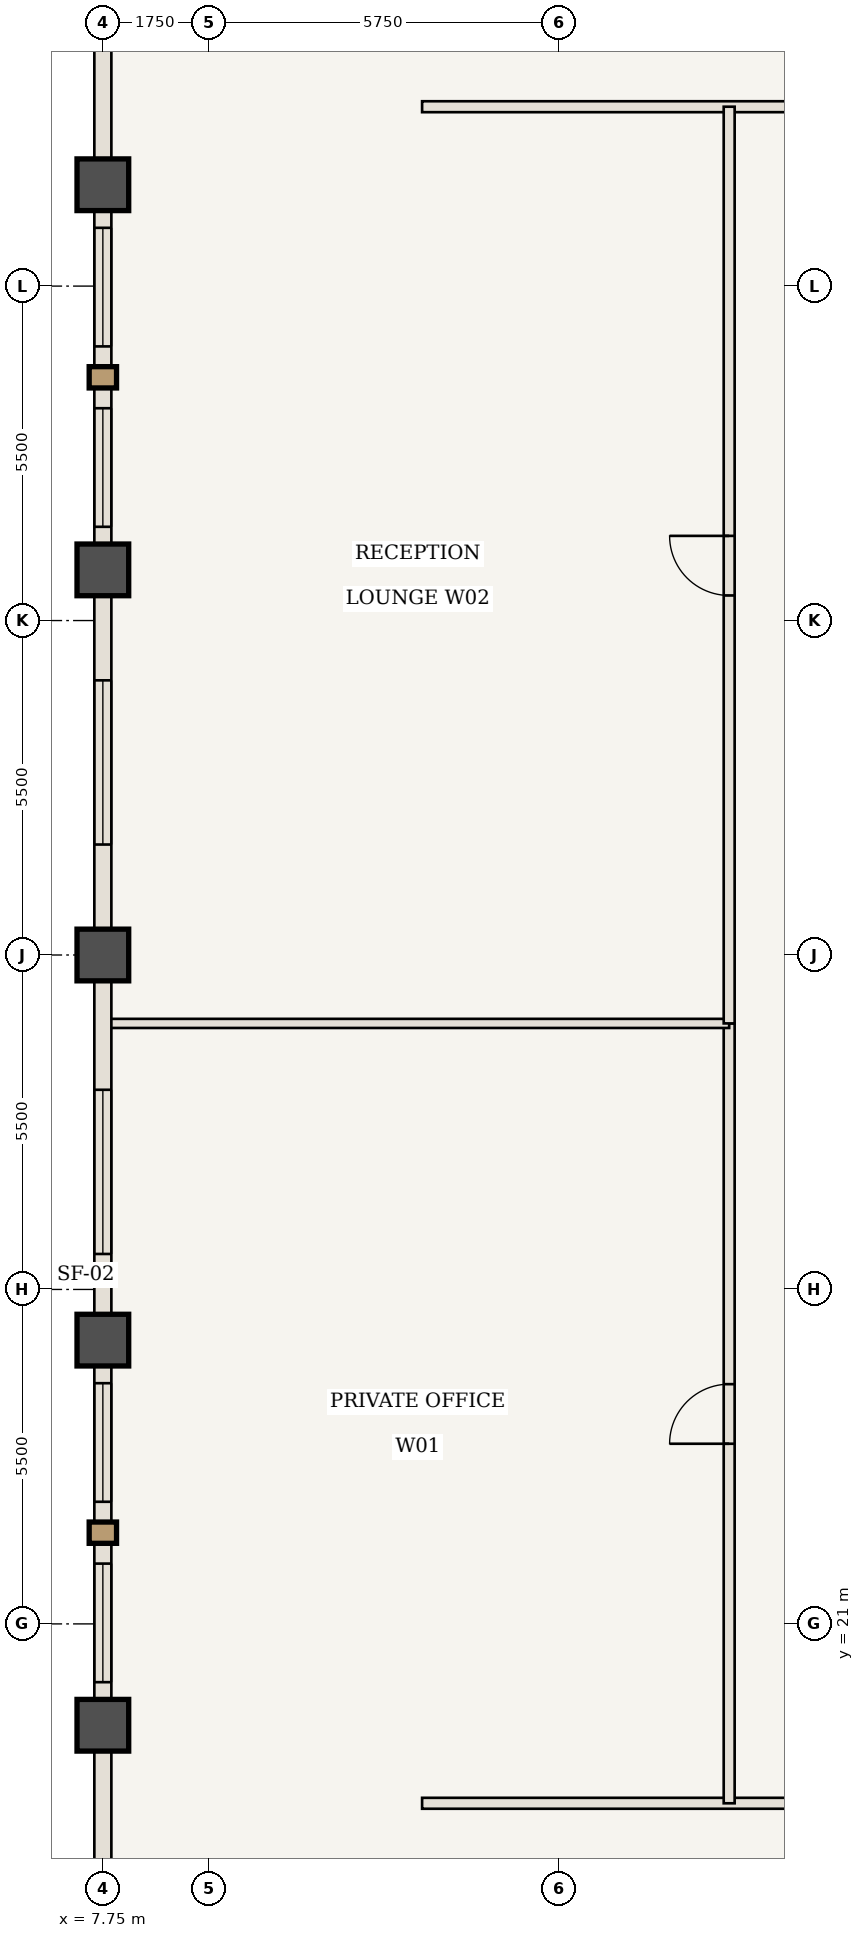
"""IFC4 building model, lengths in metres.
Left out: names, types, materials, properties, quantities, classifications, styles, units other than length and angle.
Written with IfcOpenShell. Run it as: python <this file> out.ifc"""

import sys

from ifc_helpers import new_model, si_unit, direction, frame, frame_2d, origin, origin_2d, place, context, subcontext, project, spatial, rectangle, extrude, element, fill, save


model = new_model("IFC4")
c1 = context("Model", 3, precision=1e-05, world=origin(), true_north=direction((0.0, 1.0)))
c2 = subcontext(c1, "Body", "Model", "MODEL_VIEW")
j1 = project(units=[si_unit("LENGTHUNIT", "METRE"), si_unit("PLANEANGLEUNIT", "RADIAN")], contexts=[c1])
p1 = place(None, origin())
s1 = spatial("IfcSite", under=j1, at=p1, CompositionType="ELEMENT")
p2 = place(p1, origin())
s2 = spatial("IfcBuilding", under=s1, at=p2, CompositionType="ELEMENT")
p3 = place(p2, frame((0.0, 0.0, 198.45)))
s3 = spatial("IfcBuildingStorey", under=s2, at=p3, CompositionType="ELEMENT", Elevation=198.45)
for number, where, z_axis, x_axis in (
    (1, (7.75, 19.333, 0.0), (0.0, 0.0, 1.0), (1.0, 0.0, 0.0)),
    (2, (7.75, 25.667, 0.0), (0.0, 0.0, 1.0), (1.0, 0.0, 0.0)),
    (3, (7.75, 32.0, 0.0), (0.0, 0.0, 1.0), (1.0, 0.0, 0.0)),
    (4, (7.75, 38.333, 0.0), (0.0, 0.0, 1.0), (1.0, 0.0, 0.0)),
    (5, (7.75, 44.667, 0.0), (0.0, 0.0, 1.0), (1.0, 0.0, 0.0)),
):
    element("IfcColumn", number, at=place(p3, frame(where, z_axis=z_axis, x_axis=x_axis)), inside=s3, PredefinedType="COLUMN", context=c2, shape_type="SweptSolid", body=[
        extrude(rectangle(XDim=0.85, YDim=0.85, at=origin_2d()), origin(), (0.0, 0.0, 1.0), 3.85),
    ])
p4 = place(p3, frame((13.0, 18.05, 0.0), z_axis=(0.0, 0.0, 1.0), x_axis=(1.0, 0.0, 0.0)))
e6 = element("IfcWall", 6, at=p4, inside=s3, PredefinedType="STANDARD", context=c2, shape_type="SweptSolid", body=[
    extrude(rectangle(XDim=13.242, YDim=0.18, at=frame_2d((6.621, 0.0))), origin(), (0.0, 0.0, 1.0), 3.685),
])
p5 = place(p4, frame((8.646, 0.0, 0.0)))
e7 = element("IfcOpeningElement", 7, at=p5, cuts=e6, PredefinedType="OPENING", context=c2, shape_type="SweptSolid", body=[
    extrude(rectangle(XDim=0.98, YDim=2.2, at=frame_2d((0.49, 1.1))), frame((0.0, 0.1, 0.0), z_axis=(0.0, -1.0, 0.0), x_axis=(1.0, 0.0, 0.0)), (0.0, 0.0, 1.0), 0.2),
])
p6 = place(p3, frame((13.0, 45.95, 0.0), z_axis=(0.0, 0.0, 1.0), x_axis=(1.0, 0.0, 0.0)))
e8 = element("IfcWall", 8, at=p6, inside=s3, PredefinedType="STANDARD", context=c2, shape_type="SweptSolid", body=[
    extrude(rectangle(XDim=13.592, YDim=0.18, at=frame_2d((6.796, 0.0))), origin(), (0.0, 0.0, 1.0), 3.685),
])
p7 = place(p6, frame((8.821, 0.0, 0.0)))
e9 = element("IfcOpeningElement", 9, at=p7, cuts=e8, PredefinedType="OPENING", context=c2, shape_type="SweptSolid", body=[
    extrude(rectangle(XDim=0.98, YDim=2.2, at=frame_2d((0.49, 1.1))), frame((0.0, 0.1, 0.0), z_axis=(0.0, -1.0, 0.0), x_axis=(1.0, 0.0, 0.0)), (0.0, 0.0, 1.0), 0.2),
])
p8 = place(p3, frame((18.05, 18.05, 0.0), z_axis=(0.0, 0.0, 1.0), x_axis=(0.0, 1.0, 0.0)))
e10 = element("IfcWall", 10, at=p8, inside=s3, PredefinedType="STANDARD", context=c2, shape_type="SweptSolid", body=[
    extrude(rectangle(XDim=12.825, YDim=0.18, at=frame_2d((6.413, 0.0))), origin(), (0.0, 0.0, 1.0), 3.685),
])
p9 = place(p8, frame((5.913, 0.0, 0.0)))
e11 = element("IfcOpeningElement", 11, at=p9, cuts=e10, PredefinedType="OPENING", context=c2, shape_type="SweptSolid", body=[
    extrude(rectangle(XDim=0.98, YDim=2.2, at=frame_2d((0.49, 1.1))), frame((0.0, 0.1, 0.0), z_axis=(0.0, -1.0, 0.0), x_axis=(1.0, 0.0, 0.0)), (0.0, 0.0, 1.0), 0.2),
])
p10 = place(p3, frame((7.81, 30.875, 0.0), z_axis=(0.0, 0.0, 1.0), x_axis=(1.0, 0.0, 0.0)))
e12 = element("IfcWall", 12, at=p10, inside=s3, PredefinedType="STANDARD", context=c2, shape_type="SweptSolid", body=[
    extrude(rectangle(XDim=10.24, YDim=0.15, at=frame_2d((5.12, 0.0))), origin(), (0.0, 0.0, 1.0), 3.685),
])
p11 = place(p3, frame((18.05, 30.875, 0.0), z_axis=(0.0, 0.0, 1.0), x_axis=(0.0, 1.0, 0.0)))
e13 = element("IfcWall", 13, at=p11, inside=s3, PredefinedType="STANDARD", context=c2, shape_type="SweptSolid", body=[
    extrude(rectangle(XDim=15.075, YDim=0.18, at=frame_2d((7.538, 0.0))), origin(), (0.0, 0.0, 1.0), 3.685),
])
p12 = place(p11, frame((7.038, 0.0, 0.0)))
e14 = element("IfcOpeningElement", 14, at=p12, cuts=e13, PredefinedType="OPENING", context=c2, shape_type="SweptSolid", body=[
    extrude(rectangle(XDim=0.98, YDim=2.2, at=frame_2d((0.49, 1.1))), frame((0.0, 0.1, 0.0), z_axis=(0.0, -1.0, 0.0), x_axis=(1.0, 0.0, 0.0)), (0.0, 0.0, 1.0), 0.2),
])
p13 = place(p3, frame((7.75, 13.0, 0.0), z_axis=(0.0, 0.0, 1.0), x_axis=(0.0, 1.0, 0.0)))
e15 = element("IfcWall", 15, at=p13, inside=s3, PredefinedType="USERDEFINED", context=c2, shape_type="SweptSolid", body=[
    extrude(rectangle(XDim=6.333, YDim=0.28, at=frame_2d((3.167, 0.0))), origin(), (0.0, 0.0, 1.0), 2.985),
])
p14 = place(p3, frame((7.75, 19.333, 0.0), z_axis=(0.0, 0.0, 1.0), x_axis=(0.0, 1.0, 0.0)))
e16 = element("IfcWall", 16, at=p14, inside=s3, PredefinedType="USERDEFINED", context=c2, shape_type="SweptSolid", body=[
    extrude(rectangle(XDim=6.333, YDim=0.28, at=frame_2d((3.167, 0.0))), origin(), (0.0, 0.0, 1.0), 2.985),
])
p15 = place(p14, frame((0.708, 0.0, 0.85)))
e17 = element("IfcOpeningElement", 17, at=p15, cuts=e16, PredefinedType="OPENING", context=c2, shape_type="SweptSolid", body=[
    extrude(rectangle(XDim=1.95, YDim=1.935, at=frame_2d((0.975, 0.968))), frame((0.0, 0.15, 0.0), z_axis=(0.0, -1.0, 0.0), x_axis=(1.0, 0.0, 0.0)), (0.0, 0.0, 1.0), 0.3),
])
p16 = place(p14, frame((3.675, 0.0, 0.85)))
e18 = element("IfcOpeningElement", 18, at=p16, cuts=e16, PredefinedType="OPENING", context=c2, shape_type="SweptSolid", body=[
    extrude(rectangle(XDim=1.95, YDim=1.935, at=frame_2d((0.975, 0.968))), frame((0.0, 0.15, 0.0), z_axis=(0.0, -1.0, 0.0), x_axis=(1.0, 0.0, 0.0)), (0.0, 0.0, 1.0), 0.3),
])
p17 = place(p3, frame((7.75, 25.667, 0.0), z_axis=(0.0, 0.0, 1.0), x_axis=(0.0, 1.0, 0.0)))
e19 = element("IfcWall", 19, at=p17, inside=s3, PredefinedType="USERDEFINED", context=c2, shape_type="SweptSolid", body=[
    extrude(rectangle(XDim=6.333, YDim=0.28, at=frame_2d((3.167, 0.0))), origin(), (0.0, 0.0, 1.0), 2.985),
])
p18 = place(p17, frame((1.417, 0.0, 0.85)))
e20 = element("IfcOpeningElement", 20, at=p18, cuts=e19, PredefinedType="OPENING", context=c2, shape_type="SweptSolid", body=[
    extrude(rectangle(XDim=2.7, YDim=1.935, at=frame_2d((1.35, 0.968))), frame((0.0, 0.15, 0.0), z_axis=(0.0, -1.0, 0.0), x_axis=(1.0, 0.0, 0.0)), (0.0, 0.0, 1.0), 0.3),
])
p19 = place(p3, frame((7.75, 32.0, 0.0), z_axis=(0.0, 0.0, 1.0), x_axis=(0.0, 1.0, 0.0)))
e21 = element("IfcWall", 21, at=p19, inside=s3, PredefinedType="USERDEFINED", context=c2, shape_type="SweptSolid", body=[
    extrude(rectangle(XDim=6.333, YDim=0.28, at=frame_2d((3.167, 0.0))), origin(), (0.0, 0.0, 1.0), 2.985),
])
p20 = place(p19, frame((1.817, 0.0, 0.85)))
e22 = element("IfcOpeningElement", 22, at=p20, cuts=e21, PredefinedType="OPENING", context=c2, shape_type="SweptSolid", body=[
    extrude(rectangle(XDim=2.7, YDim=1.935, at=frame_2d((1.35, 0.968))), frame((0.0, 0.15, 0.0), z_axis=(0.0, -1.0, 0.0), x_axis=(1.0, 0.0, 0.0)), (0.0, 0.0, 1.0), 0.3),
])
p21 = place(p3, frame((7.75, 38.333, 0.0), z_axis=(0.0, 0.0, 1.0), x_axis=(0.0, 1.0, 0.0)))
e23 = element("IfcWall", 23, at=p21, inside=s3, PredefinedType="USERDEFINED", context=c2, shape_type="SweptSolid", body=[
    extrude(rectangle(XDim=6.333, YDim=0.28, at=frame_2d((3.167, 0.0))), origin(), (0.0, 0.0, 1.0), 2.985),
])
p22 = place(p21, frame((0.708, 0.0, 0.85)))
e24 = element("IfcOpeningElement", 24, at=p22, cuts=e23, PredefinedType="OPENING", context=c2, shape_type="SweptSolid", body=[
    extrude(rectangle(XDim=1.95, YDim=1.935, at=frame_2d((0.975, 0.968))), frame((0.0, 0.15, 0.0), z_axis=(0.0, -1.0, 0.0), x_axis=(1.0, 0.0, 0.0)), (0.0, 0.0, 1.0), 0.3),
])
p23 = place(p21, frame((3.675, 0.0, 0.85)))
e25 = element("IfcOpeningElement", 25, at=p23, cuts=e23, PredefinedType="OPENING", context=c2, shape_type="SweptSolid", body=[
    extrude(rectangle(XDim=1.95, YDim=1.935, at=frame_2d((0.975, 0.968))), frame((0.0, 0.15, 0.0), z_axis=(0.0, -1.0, 0.0), x_axis=(1.0, 0.0, 0.0)), (0.0, 0.0, 1.0), 0.3),
])
p24 = place(p3, frame((7.75, 44.667, 0.0), z_axis=(0.0, 0.0, 1.0), x_axis=(0.0, 1.0, 0.0)))
e26 = element("IfcWall", 26, at=p24, inside=s3, PredefinedType="USERDEFINED", context=c2, shape_type="SweptSolid", body=[
    extrude(rectangle(XDim=6.333, YDim=0.28, at=frame_2d((3.167, 0.0))), origin(), (0.0, 0.0, 1.0), 2.985),
])
p25 = place(p9, origin())
e27 = element("IfcDoor", 27, at=p25, inside=s3, OperationType="SINGLE_SWING_LEFT", PredefinedType="DOOR", context=c2, shape_type="SweptSolid", body=[
    extrude(rectangle(XDim=0.98, YDim=2.2, at=frame_2d((0.49, 1.1))), frame((0.0, 0.025, 0.0), z_axis=(0.0, -1.0, 0.0), x_axis=(1.0, 0.0, 0.0)), (0.0, 0.0, 1.0), 0.05),
])
fill(e11, e27)
p26 = place(p12, origin())
e28 = element("IfcDoor", 28, at=p26, inside=s3, OperationType="SINGLE_SWING_RIGHT", PredefinedType="DOOR", context=c2, shape_type="SweptSolid", body=[
    extrude(rectangle(XDim=0.98, YDim=2.2, at=frame_2d((0.49, 1.1))), frame((0.0, 0.025, 0.0), z_axis=(0.0, -1.0, 0.0), x_axis=(1.0, 0.0, 0.0)), (0.0, 0.0, 1.0), 0.05),
])
fill(e14, e28)
p27 = place(p15, origin())
e29 = element("IfcWindow", 29, at=p27, inside=s3, PartitioningType="SINGLE_PANEL", PredefinedType="WINDOW", context=c2, shape_type="SweptSolid", body=[
    extrude(rectangle(XDim=1.95, YDim=1.935, at=frame_2d((0.975, 0.968))), frame((0.0, 0.03, 0.0), z_axis=(0.0, -1.0, 0.0), x_axis=(1.0, 0.0, 0.0)), (0.0, 0.0, 1.0), 0.06),
])
fill(e17, e29)
p28 = place(p16, origin())
e30 = element("IfcWindow", 30, at=p28, inside=s3, PartitioningType="SINGLE_PANEL", PredefinedType="WINDOW", context=c2, shape_type="SweptSolid", body=[
    extrude(rectangle(XDim=1.95, YDim=1.935, at=frame_2d((0.975, 0.968))), frame((0.0, 0.03, 0.0), z_axis=(0.0, -1.0, 0.0), x_axis=(1.0, 0.0, 0.0)), (0.0, 0.0, 1.0), 0.06),
])
fill(e18, e30)
p29 = place(p18, origin())
e31 = element("IfcWindow", 31, at=p29, inside=s3, PartitioningType="SINGLE_PANEL", PredefinedType="WINDOW", context=c2, shape_type="SweptSolid", body=[
    extrude(rectangle(XDim=2.7, YDim=1.935, at=frame_2d((1.35, 0.968))), frame((0.0, 0.03, 0.0), z_axis=(0.0, -1.0, 0.0), x_axis=(1.0, 0.0, 0.0)), (0.0, 0.0, 1.0), 0.06),
])
fill(e20, e31)
p30 = place(p20, origin())
e32 = element("IfcWindow", 32, at=p30, inside=s3, PartitioningType="SINGLE_PANEL", PredefinedType="WINDOW", context=c2, shape_type="SweptSolid", body=[
    extrude(rectangle(XDim=2.7, YDim=1.935, at=frame_2d((1.35, 0.968))), frame((0.0, 0.03, 0.0), z_axis=(0.0, -1.0, 0.0), x_axis=(1.0, 0.0, 0.0)), (0.0, 0.0, 1.0), 0.06),
])
fill(e22, e32)
p31 = place(p22, origin())
e33 = element("IfcWindow", 33, at=p31, inside=s3, PartitioningType="SINGLE_PANEL", PredefinedType="WINDOW", context=c2, shape_type="SweptSolid", body=[
    extrude(rectangle(XDim=1.95, YDim=1.935, at=frame_2d((0.975, 0.968))), frame((0.0, 0.03, 0.0), z_axis=(0.0, -1.0, 0.0), x_axis=(1.0, 0.0, 0.0)), (0.0, 0.0, 1.0), 0.06),
])
fill(e24, e33)
p32 = place(p23, origin())
e34 = element("IfcWindow", 34, at=p32, inside=s3, PartitioningType="SINGLE_PANEL", PredefinedType="WINDOW", context=c2, shape_type="SweptSolid", body=[
    extrude(rectangle(XDim=1.95, YDim=1.935, at=frame_2d((0.975, 0.968))), frame((0.0, 0.03, 0.0), z_axis=(0.0, -1.0, 0.0), x_axis=(1.0, 0.0, 0.0)), (0.0, 0.0, 1.0), 0.06),
])
fill(e25, e34)
save(model, sys.argv[1])
